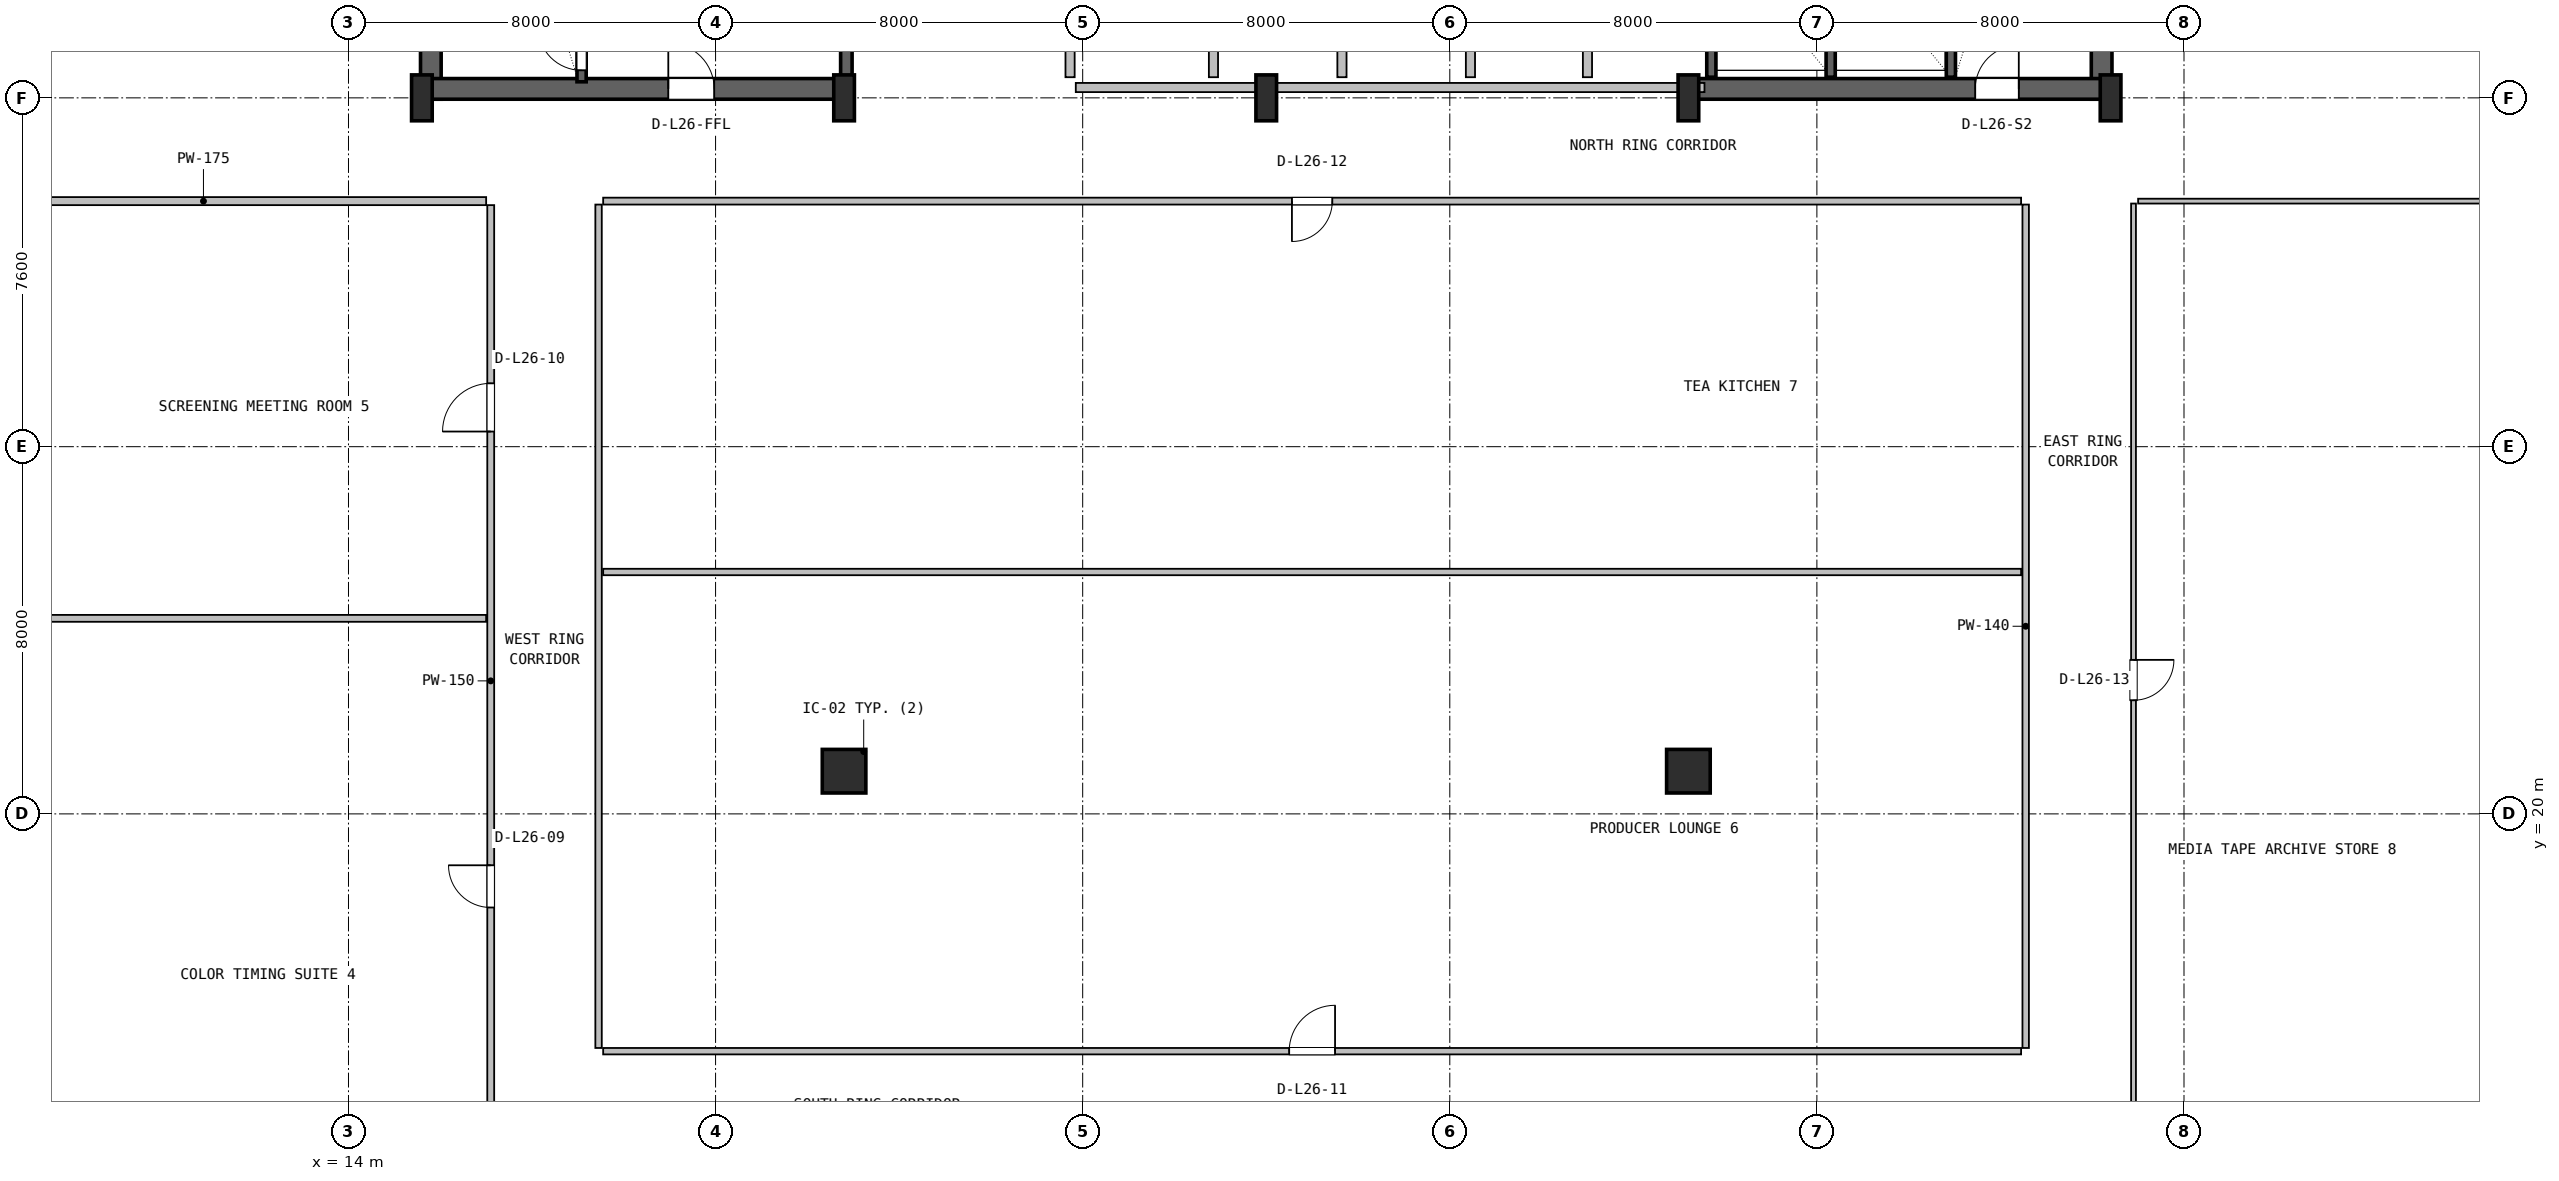
"""IFC4 building model, lengths in metres.
Left out: names, types, materials, properties, quantities, classifications, styles, units other than length and angle.
Written with IfcOpenShell. Run it as: python <this file> out.ifc"""

import sys

from ifc_helpers import new_model, si_unit, direction, frame, frame_2d, origin, origin_2d, place, context, subcontext, project, spatial, rectangle, i_section, extrude, source, transform, mapped, element, fill, save


model = new_model("IFC4")
c1 = context("Model", 3, precision=1e-05, world=origin(), true_north=direction((0.0, 1.0)))
c2 = subcontext(c1, "Body", "Model", "MODEL_VIEW")
j1 = project(units=[si_unit("LENGTHUNIT", "METRE"), si_unit("PLANEANGLEUNIT", "RADIAN")], contexts=[c1])
p1 = place(None, origin())
s1 = spatial("IfcSite", under=j1, at=p1, CompositionType="ELEMENT")
p2 = place(p1, origin())
s2 = spatial("IfcBuilding", under=s1, at=p2, CompositionType="ELEMENT")
p3 = place(p2, frame((0.0, 0.0, 110.6)))
s3 = spatial("IfcBuildingStorey", under=s2, at=p3, CompositionType="ELEMENT", Elevation=110.6)
for number, where, z_axis, x_axis in (
    (1, (15.795, 35.57, 0.0), (0.0, 0.0, 1.0), (0.0, 1.0, 0.0)),
    (2, (52.205, 35.57, 0.0), (0.0, 0.0, 1.0), (0.0, 1.0, 0.0)),
):
    element("IfcWall", number, at=place(p3, frame(where, z_axis=z_axis, x_axis=x_axis)), inside=s3, PredefinedType="SHEAR", context=c2, shape_type="SweptSolid", body=[
        extrude(rectangle(XDim=11.23, YDim=0.45, at=frame_2d((5.615, 0.0))), origin(), (0.0, 0.0, 1.0), 3.55),
    ])
p4 = place(p3, frame((15.57, 35.795, 0.0), z_axis=(0.0, 0.0, 1.0), x_axis=(1.0, 0.0, 0.0)))
e3 = element("IfcWall", 3, at=p4, inside=s3, PredefinedType="SHEAR", context=c2, shape_type="SweptSolid", body=[
    extrude(rectangle(XDim=9.23, YDim=0.45, at=frame_2d((4.615, 0.0))), origin(), (0.0, 0.0, 1.0), 3.55),
])
p5 = place(p4, frame((5.4, 0.0, 0.0)))
e4 = element("IfcOpeningElement", 4, at=p5, cuts=e3, PredefinedType="OPENING", context=c2, shape_type="SweptSolid", body=[
    extrude(rectangle(XDim=1.0, YDim=2.1, at=frame_2d((0.5, 1.05))), frame((0.0, 0.235, 0.0), z_axis=(0.0, -1.0, 0.0), x_axis=(1.0, 0.0, 0.0)), (0.0, 0.0, 1.0), 0.47),
])
p6 = place(p3, frame((43.2, 35.795, 0.0), z_axis=(0.0, 0.0, 1.0), x_axis=(1.0, 0.0, 0.0)))
e5 = element("IfcWall", 5, at=p6, inside=s3, PredefinedType="SHEAR", context=c2, shape_type="SweptSolid", body=[
    extrude(rectangle(XDim=9.23, YDim=0.45, at=frame_2d((4.615, 0.0))), origin(), (0.0, 0.0, 1.0), 3.55),
])
p7 = place(p6, frame((6.25, 0.0, 0.0)))
e6 = element("IfcOpeningElement", 6, at=p7, cuts=e5, PredefinedType="OPENING", context=c2, shape_type="SweptSolid", body=[
    extrude(rectangle(XDim=0.95, YDim=2.1, at=frame_2d((0.475, 1.05))), frame((0.0, 0.235, 0.0), z_axis=(0.0, -1.0, 0.0), x_axis=(1.0, 0.0, 0.0)), (0.0, 0.0, 1.0), 0.47),
])
m1 = source(origin(), c2, "Body", "SweptSolid", [
    extrude(i_section(OverallWidth=0.45, OverallDepth=1.0, WebThickness=0.016, FlangeThickness=0.03, FilletRadius=0.016, at=origin_2d()), origin(), (0.0, 0.0, 1.0), 3.8),
])
for number, where, z_axis, x_axis in (
    (7, (15.6, 35.6, 0.0), (0.0, 0.0, 1.0), (1.0, 0.0, 0.0)),
    (8, (24.8, 35.6, 0.0), (0.0, 0.0, 1.0), (1.0, 0.0, 0.0)),
    (9, (34.0, 35.6, 0.0), (0.0, 0.0, 1.0), (1.0, 0.0, 0.0)),
    (10, (43.2, 35.6, 0.0), (0.0, 0.0, 1.0), (1.0, 0.0, 0.0)),
    (11, (52.4, 35.6, 0.0), (0.0, 0.0, 1.0), (1.0, 0.0, 0.0)),
):
    element("IfcColumn", number, at=place(p3, frame(where, z_axis=z_axis, x_axis=x_axis)), inside=s3, PredefinedType="COLUMN", context=c2, shape_type="MappedRepresentation", body=[
        mapped(m1, transform((0.0, 0.0, 0.0), x_axis=(1.0, 0.0, 0.0), y_axis=(0.0, 1.0, 0.0), z_axis=(0.0, 0.0, 1.0), scale=1.0)),
    ])
m2 = source(origin(), c2, "Body", "SweptSolid", [
    extrude(rectangle(XDim=0.95, YDim=0.95, at=origin_2d()), origin(), (0.0, 0.0, 1.0), 3.8),
])
for number, where, z_axis, x_axis in (
    (12, (24.8, 20.93, 0.0), (0.0, 0.0, 1.0), (1.0, 0.0, 0.0)),
    (13, (43.2, 20.93, 0.0), (0.0, 0.0, 1.0), (1.0, 0.0, 0.0)),
):
    element("IfcColumn", number, at=place(p3, frame(where, z_axis=z_axis, x_axis=x_axis)), inside=s3, PredefinedType="COLUMN", context=c2, shape_type="MappedRepresentation", body=[
        mapped(m2, transform((0.0, 0.0, 0.0), x_axis=(1.0, 0.0, 0.0), y_axis=(0.0, 1.0, 0.0), z_axis=(0.0, 0.0, 1.0), scale=1.0)),
    ])
p8 = place(p3, frame((19.08, 35.95, 0.0), z_axis=(0.0, 0.0, 1.0), x_axis=(0.0, 1.0, 0.0)))
e14 = element("IfcWall", 14, at=p8, inside=s3, PredefinedType="SHEAR", context=c2, shape_type="SweptSolid", body=[
    extrude(rectangle(XDim=9.65, YDim=0.2, at=frame_2d((4.825, 0.0))), origin(), (0.0, 0.0, 1.0), 3.55),
])
p9 = place(p8, frame((0.25, 0.0, 0.0)))
e15 = element("IfcOpeningElement", 15, at=p9, cuts=e14, PredefinedType="OPENING", context=c2, shape_type="SweptSolid", body=[
    extrude(rectangle(XDim=0.95, YDim=2.1, at=frame_2d((0.475, 1.05))), frame((0.0, 0.11, 0.0), z_axis=(0.0, -1.0, 0.0), x_axis=(1.0, 0.0, 0.0)), (0.0, 0.0, 1.0), 0.22),
])
p10 = place(p3, frame((24.85, 36.05, 0.0), z_axis=(0.0, 0.0, 1.0), x_axis=(0.0, 1.0, 0.0)))
e16 = element("IfcWall", 16, at=p10, inside=s3, PredefinedType="SHEAR", context=c2, shape_type="SweptSolid", body=[
    extrude(rectangle(XDim=10.45, YDim=0.25, at=frame_2d((5.225, 0.0))), origin(), (0.0, 0.0, 1.0), 3.55),
])
p11 = place(p3, frame((48.92, 36.05, 0.0), z_axis=(0.0, 0.0, 1.0), x_axis=(0.0, 1.0, 0.0)))
e17 = element("IfcWall", 17, at=p11, inside=s3, PredefinedType="SHEAR", context=c2, shape_type="SweptSolid", body=[
    extrude(rectangle(XDim=10.5, YDim=0.2, at=frame_2d((5.25, 0.0))), origin(), (0.0, 0.0, 1.0), 3.55),
])
for number, where, z_axis, x_axis in (
    (18, (43.7, 36.05, 0.0), (0.0, 0.0, 1.0), (0.0, 1.0, 0.0)),
    (19, (46.3, 36.05, 0.0), (0.0, 0.0, 1.0), (0.0, 1.0, 0.0)),
):
    element("IfcWall", number, at=place(p3, frame(where, z_axis=z_axis, x_axis=x_axis)), inside=s3, PredefinedType="SHEAR", context=c2, shape_type="SweptSolid", body=[
        extrude(rectangle(XDim=3.05, YDim=0.2, at=frame_2d((1.525, 0.0))), origin(), (0.0, 0.0, 1.0), 3.55),
    ])
p12 = place(p3, frame((29.85, 35.825, 0.0), z_axis=(0.0, 0.0, 1.0), x_axis=(1.0, 0.0, 0.0)))
e20 = element("IfcWall", 20, at=p12, inside=s3, PredefinedType="SOLIDWALL", context=c2, shape_type="SweptSolid", body=[
    extrude(rectangle(XDim=13.7, YDim=0.2, at=frame_2d((6.85, 0.0))), origin(), (0.0, 0.0, 1.0), 2.325),
])
for number, where, z_axis, x_axis in (
    (21, (32.85, 36.05, 0.0), (0.0, 0.0, 1.0), (0.0, 1.0, 0.0)),
    (22, (29.725, 36.05, 0.0), (0.0, 0.0, 1.0), (0.0, 1.0, 0.0)),
    (23, (35.65, 36.05, 0.0), (0.0, 0.0, 1.0), (0.0, 1.0, 0.0)),
    (24, (38.45, 36.05, 0.0), (0.0, 0.0, 1.0), (0.0, 1.0, 0.0)),
):
    element("IfcWall", number, at=place(p3, frame(where, z_axis=z_axis, x_axis=x_axis)), inside=s3, PredefinedType="PLUMBINGWALL", context=c2, shape_type="SweptSolid", body=[
        extrude(rectangle(XDim=3.1, YDim=0.2, at=frame_2d((1.55, 0.0))), origin(), (0.0, 0.0, 1.0), 3.53),
    ])
p13 = place(p3, frame((41.0, 36.05, 0.0), z_axis=(0.0, 0.0, 1.0), x_axis=(0.0, 1.0, 0.0)))
e25 = element("IfcWall", 25, at=p13, inside=s3, PredefinedType="SOLIDWALL", context=c2, shape_type="SweptSolid", body=[
    extrude(rectangle(XDim=3.1, YDim=0.2, at=frame_2d((1.55, 0.0))), origin(), (0.0, 0.0, 1.0), 3.53),
])
p14 = place(p3, frame((17.1, 12.533, 0.0), z_axis=(0.0, 0.0, 1.0), x_axis=(0.0, 1.0, 0.0)))
e26 = element("IfcWall", 26, at=p14, inside=s3, PredefinedType="PARTITIONING", context=c2, shape_type="SweptSolid", body=[
    extrude(rectangle(XDim=20.73, YDim=0.15, at=frame_2d((10.365, 0.0))), origin(), (0.0, 0.0, 1.0), 3.222),
])
p15 = place(p14, frame((5.427, 0.0, 0.0)))
e27 = element("IfcOpeningElement", 27, at=p15, cuts=e26, PredefinedType="OPENING", context=c2, shape_type="SweptSolid", body=[
    extrude(rectangle(XDim=0.92, YDim=2.08, at=frame_2d((0.46, 1.04))), frame((0.0, 0.085, 0.0), z_axis=(0.0, -1.0, 0.0), x_axis=(1.0, 0.0, 0.0)), (0.0, 0.0, 1.0), 0.17),
])
p16 = place(p14, frame((15.797, 0.0, 0.0)))
e28 = element("IfcOpeningElement", 28, at=p16, cuts=e26, PredefinedType="OPENING", context=c2, shape_type="SweptSolid", body=[
    extrude(rectangle(XDim=1.05, YDim=2.1, at=frame_2d((0.525, 1.05))), frame((0.0, 0.085, 0.0), z_axis=(0.0, -1.0, 0.0), x_axis=(1.0, 0.0, 0.0)), (0.0, 0.0, 1.0), 0.17),
])
p17 = place(p3, frame((4.68, 24.26, 0.0), z_axis=(0.0, 0.0, 1.0), x_axis=(1.0, 0.0, 0.0)))
e29 = element("IfcWall", 29, at=p17, inside=s3, PredefinedType="PARTITIONING", context=c2, shape_type="SweptSolid", body=[
    extrude(rectangle(XDim=12.32, YDim=0.15, at=frame_2d((6.16, 0.0))), origin(), (0.0, 0.0, 1.0), 3.108),
])
p18 = place(p3, frame((4.68, 33.35, 0.0), z_axis=(0.0, 0.0, 1.0), x_axis=(1.0, 0.0, 0.0)))
e30 = element("IfcWall", 30, at=p18, inside=s3, PredefinedType="PARTITIONING", context=c2, shape_type="SweptSolid", body=[
    extrude(rectangle(XDim=12.32, YDim=0.175, at=frame_2d((6.16, 0.0))), origin(), (0.0, 0.0, 1.0), 3.108),
])
p19 = place(p3, frame((19.55, 14.83, 0.0), z_axis=(0.0, 0.0, 1.0), x_axis=(1.0, 0.0, 0.0)))
e31 = element("IfcWall", 31, at=p19, inside=s3, PredefinedType="PARTITIONING", context=c2, shape_type="SweptSolid", body=[
    extrude(rectangle(XDim=30.9, YDim=0.14, at=frame_2d((15.45, 0.0))), origin(), (0.0, 0.0, 1.0), 2.83),
])
p20 = place(p19, frame((14.95, 0.0, 0.0)))
e32 = element("IfcOpeningElement", 32, at=p20, cuts=e31, PredefinedType="OPENING", context=c2, shape_type="SweptSolid", body=[
    extrude(rectangle(XDim=1.0, YDim=2.1, at=frame_2d((0.5, 1.05))), frame((0.0, 0.08, 0.0), z_axis=(0.0, -1.0, 0.0), x_axis=(1.0, 0.0, 0.0)), (0.0, 0.0, 1.0), 0.16),
])
p21 = place(p3, frame((50.55, 14.9, 0.0), z_axis=(0.0, 0.0, 1.0), x_axis=(0.0, 1.0, 0.0)))
e33 = element("IfcWall", 33, at=p21, inside=s3, PredefinedType="PARTITIONING", context=c2, shape_type="SweptSolid", body=[
    extrude(rectangle(XDim=18.375, YDim=0.14, at=frame_2d((9.188, 0.0))), origin(), (0.0, 0.0, 1.0), 3.222),
])
p22 = place(p3, frame((19.55, 25.27, 0.0), z_axis=(0.0, 0.0, 1.0), x_axis=(1.0, 0.0, 0.0)))
e34 = element("IfcWall", 34, at=p22, inside=s3, PredefinedType="PARTITIONING", context=c2, shape_type="SweptSolid", body=[
    extrude(rectangle(XDim=30.9, YDim=0.14, at=frame_2d((15.45, 0.0))), origin(), (0.0, 0.0, 1.0), 2.83),
])
p23 = place(p3, frame((19.45, 14.9, 0.0), z_axis=(0.0, 0.0, 1.0), x_axis=(0.0, 1.0, 0.0)))
e35 = element("IfcWall", 35, at=p23, inside=s3, PredefinedType="PARTITIONING", context=c2, shape_type="SweptSolid", body=[
    extrude(rectangle(XDim=18.375, YDim=0.14, at=frame_2d((9.188, 0.0))), origin(), (0.0, 0.0, 1.0), 3.222),
])
p24 = place(p3, frame((19.55, 33.35, 0.0), z_axis=(0.0, 0.0, 1.0), x_axis=(1.0, 0.0, 0.0)))
e36 = element("IfcWall", 36, at=p24, inside=s3, PredefinedType="PARTITIONING", context=c2, shape_type="SweptSolid", body=[
    extrude(rectangle(XDim=30.9, YDim=0.15, at=frame_2d((15.45, 0.0))), origin(), (0.0, 0.0, 1.0), 2.83),
])
p25 = place(p24, frame((15.01, 0.0, 0.0)))
e37 = element("IfcOpeningElement", 37, at=p25, cuts=e36, PredefinedType="OPENING", context=c2, shape_type="SweptSolid", body=[
    extrude(rectangle(XDim=0.88, YDim=2.06, at=frame_2d((0.44, 1.03))), frame((0.0, 0.085, 0.0), z_axis=(0.0, -1.0, 0.0), x_axis=(1.0, 0.0, 0.0)), (0.0, 0.0, 1.0), 0.17),
])
p26 = place(p3, frame((53.0, 33.35, 0.0), z_axis=(0.0, 0.0, 1.0), x_axis=(1.0, 0.0, 0.0)))
e38 = element("IfcWall", 38, at=p26, inside=s3, PredefinedType="PARTITIONING", context=c2, shape_type="SweptSolid", body=[
    extrude(rectangle(XDim=10.32, YDim=0.105, at=frame_2d((5.16, 0.0))), origin(), (0.0, 0.0, 1.0), 3.108),
])
p27 = place(p3, frame((52.9, 12.533, 0.0), z_axis=(0.0, 0.0, 1.0), x_axis=(0.0, 1.0, 0.0)))
e39 = element("IfcWall", 39, at=p27, inside=s3, PredefinedType="PARTITIONING", context=c2, shape_type="SweptSolid", body=[
    extrude(rectangle(XDim=20.764, YDim=0.105, at=frame_2d((10.382, 0.0))), origin(), (0.0, 0.0, 1.0), 3.222),
])
p28 = place(p27, frame((9.942, 0.0, 0.0)))
e40 = element("IfcOpeningElement", 40, at=p28, cuts=e39, PredefinedType="OPENING", context=c2, shape_type="SweptSolid", body=[
    extrude(rectangle(XDim=0.88, YDim=2.06, at=frame_2d((0.44, 1.03))), frame((0.0, 0.062, 0.0), z_axis=(0.0, -1.0, 0.0), x_axis=(1.0, 0.0, 0.0)), (0.0, 0.0, 1.0), 0.125),
])
m3 = source(origin(), c2, "Body", "SweptSolid", [
    extrude(rectangle(XDim=0.95, YDim=2.1, at=frame_2d((0.475, 1.05))), frame((0.0, 0.025, 0.0), z_axis=(0.0, -1.0, 0.0), x_axis=(1.0, 0.0, 0.0)), (0.0, 0.0, 1.0), 0.05),
])
p29 = place(p9, origin())
e41 = element("IfcDoor", 41, at=p29, inside=s3, OperationType="SINGLE_SWING_RIGHT", PredefinedType="DOOR", context=c2, shape_type="MappedRepresentation", body=[
    mapped(m3, transform((0.0, 0.0, 0.0), x_axis=(1.0, 0.0, 0.0), y_axis=(0.0, 1.0, 0.0), z_axis=(0.0, 0.0, 1.0), scale=1.0)),
])
fill(e15, e41)
m4 = source(origin(), c2, "Body", "SweptSolid", [
    extrude(rectangle(XDim=1.0, YDim=2.1, at=frame_2d((0.5, 1.05))), frame((0.0, 0.025, 0.0), z_axis=(0.0, -1.0, 0.0), x_axis=(1.0, 0.0, 0.0)), (0.0, 0.0, 1.0), 0.05),
])
p30 = place(p5, origin())
e42 = element("IfcDoor", 42, at=p30, inside=s3, OperationType="SINGLE_SWING_LEFT", PredefinedType="DOOR", context=c2, shape_type="MappedRepresentation", body=[
    mapped(m4, transform((0.0, 0.0, 0.0), x_axis=(1.0, 0.0, 0.0), y_axis=(0.0, 1.0, 0.0), z_axis=(0.0, 0.0, 1.0), scale=1.0)),
])
fill(e4, e42)
p31 = place(p7, origin())
e43 = element("IfcDoor", 43, at=p31, inside=s3, OperationType="SINGLE_SWING_RIGHT", PredefinedType="DOOR", context=c2, shape_type="MappedRepresentation", body=[
    mapped(m3, transform((0.0, 0.0, 0.0), x_axis=(1.0, 0.0, 0.0), y_axis=(0.0, 1.0, 0.0), z_axis=(0.0, 0.0, 1.0), scale=1.0)),
])
fill(e6, e43)
m5 = source(origin(), c2, "Body", "SweptSolid", [
    extrude(rectangle(XDim=0.92, YDim=2.08, at=frame_2d((0.46, 1.04))), frame((0.0, 0.025, 0.0), z_axis=(0.0, -1.0, 0.0), x_axis=(1.0, 0.0, 0.0)), (0.0, 0.0, 1.0), 0.05),
])
p32 = place(p15, origin())
e44 = element("IfcDoor", 44, at=p32, inside=s3, OperationType="SINGLE_SWING_RIGHT", PredefinedType="DOOR", context=c2, shape_type="MappedRepresentation", body=[
    mapped(m5, transform((0.0, 0.0, 0.0), x_axis=(1.0, 0.0, 0.0), y_axis=(0.0, 1.0, 0.0), z_axis=(0.0, 0.0, 1.0), scale=1.0)),
])
fill(e27, e44)
m6 = source(origin(), c2, "Body", "SweptSolid", [
    extrude(rectangle(XDim=1.05, YDim=2.1, at=frame_2d((0.525, 1.05))), frame((0.0, 0.025, 0.0), z_axis=(0.0, -1.0, 0.0), x_axis=(1.0, 0.0, 0.0)), (0.0, 0.0, 1.0), 0.05),
])
p33 = place(p16, origin())
e45 = element("IfcDoor", 45, at=p33, inside=s3, OperationType="SINGLE_SWING_LEFT", PredefinedType="DOOR", context=c2, shape_type="MappedRepresentation", body=[
    mapped(m6, transform((0.0, 0.0, 0.0), x_axis=(1.0, 0.0, 0.0), y_axis=(0.0, 1.0, 0.0), z_axis=(0.0, 0.0, 1.0), scale=1.0)),
])
fill(e28, e45)
m7 = source(origin(), c2, "Body", "SweptSolid", [
    extrude(rectangle(XDim=1.0, YDim=2.1, at=frame_2d((0.5, 1.05))), frame((0.0, 0.025, 0.0), z_axis=(0.0, -1.0, 0.0), x_axis=(1.0, 0.0, 0.0)), (0.0, 0.0, 1.0), 0.05),
])
p34 = place(p20, origin())
e46 = element("IfcDoor", 46, at=p34, inside=s3, OperationType="SINGLE_SWING_RIGHT", PredefinedType="DOOR", context=c2, shape_type="MappedRepresentation", body=[
    mapped(m7, transform((0.0, 0.0, 0.0), x_axis=(1.0, 0.0, 0.0), y_axis=(0.0, 1.0, 0.0), z_axis=(0.0, 0.0, 1.0), scale=1.0)),
])
fill(e32, e46)
m8 = source(origin(), c2, "Body", "SweptSolid", [
    extrude(rectangle(XDim=0.88, YDim=2.06, at=frame_2d((0.44, 1.03))), frame((0.0, 0.025, 0.0), z_axis=(0.0, -1.0, 0.0), x_axis=(1.0, 0.0, 0.0)), (0.0, 0.0, 1.0), 0.05),
])
p35 = place(p25, frame((0.88, 0.0, 0.0), z_axis=(0.0, 0.0, 1.0), x_axis=(-1.0, 0.0, 0.0)))
e47 = element("IfcDoor", 47, at=p35, inside=s3, OperationType="SINGLE_SWING_LEFT", PredefinedType="DOOR", context=c2, shape_type="MappedRepresentation", body=[
    mapped(m8, transform((0.0, 0.0, 0.0), x_axis=(1.0, 0.0, 0.0), y_axis=(0.0, 1.0, 0.0), z_axis=(0.0, 0.0, 1.0), scale=1.0)),
])
fill(e37, e47)
p36 = place(p28, frame((0.88, 0.0, 0.0), z_axis=(0.0, 0.0, 1.0), x_axis=(-1.0, 0.0, 0.0)))
e48 = element("IfcDoor", 48, at=p36, inside=s3, OperationType="SINGLE_SWING_RIGHT", PredefinedType="DOOR", context=c2, shape_type="MappedRepresentation", body=[
    mapped(m8, transform((0.0, 0.0, 0.0), x_axis=(1.0, 0.0, 0.0), y_axis=(0.0, 1.0, 0.0), z_axis=(0.0, 0.0, 1.0), scale=1.0)),
])
fill(e40, e48)
save(model, sys.argv[1])
